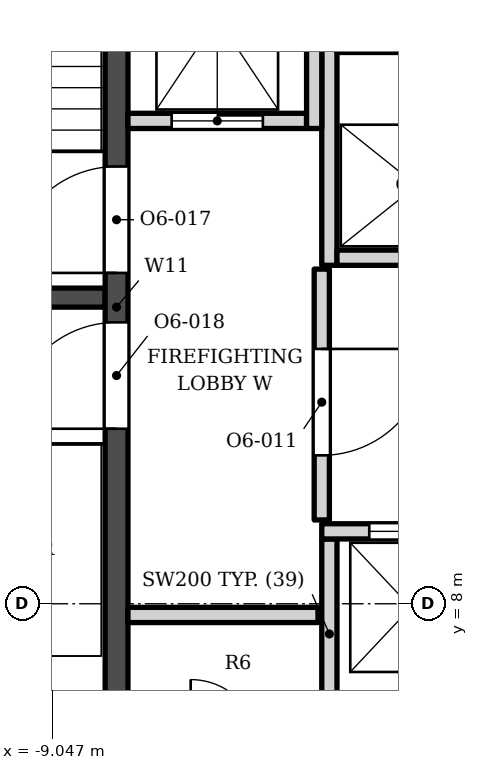
"""IFC4 building model, lengths in metres.
Left out: names, types, materials, properties, quantities, classifications, styles, units other than length and angle.
Written with IfcOpenShell. Run it as: python <this file> out.ifc"""

import sys

from ifc_helpers import new_model, si_unit, direction, frame, frame_2d, origin, place, context, subcontext, project, spatial, rectangle, extrude, element, fill, save


model = new_model("IFC4")
c1 = context("Model", 3, precision=1e-05, world=origin(), true_north=direction((0.0, 1.0)))
c2 = subcontext(c1, "Body", "Model", "MODEL_VIEW")
j1 = project(units=[si_unit("LENGTHUNIT", "METRE"), si_unit("PLANEANGLEUNIT", "RADIAN")], contexts=[c1])
p1 = place(None, origin())
s1 = spatial("IfcSite", under=j1, at=p1, CompositionType="ELEMENT")
p2 = place(p1, origin())
s2 = spatial("IfcBuilding", under=s1, at=p2, CompositionType="ELEMENT")
p3 = place(p2, frame((0.0, 0.0, 208.1)))
s3 = spatial("IfcBuildingStorey", under=s2, at=p3, CompositionType="ELEMENT", Elevation=208.1)
p4 = place(p3, frame((-8.2, 5.253, 0.0), z_axis=(0.0, 0.0, 1.0), x_axis=(0.0, 1.0, 0.0)))
e1 = element("IfcWall", 1, at=p4, inside=s3, PredefinedType="SHEAR", context=c2, shape_type="SweptSolid", body=[
    extrude(rectangle(XDim=13.3, YDim=0.3, at=frame_2d((6.65, 0.0))), origin(), (0.0, 0.0, 1.0), 3.9),
])
p5 = place(p4, frame((7.1, 0.0, 0.0)))
e2 = element("IfcOpeningElement", 2, at=p5, cuts=e1, PredefinedType="OPENING", context=c2, shape_type="SweptSolid", body=[
    extrude(rectangle(XDim=1.4, YDim=2.1, at=frame_2d((0.7, 1.05))), frame((0.0, 0.16, 0.0), z_axis=(0.0, -1.0, 0.0), x_axis=(1.0, 0.0, 0.0)), (0.0, 0.0, 1.0), 0.32),
])
p6 = place(p4, frame((5.05, 0.0, 0.0)))
e3 = element("IfcOpeningElement", 3, at=p6, cuts=e1, PredefinedType="OPENING", context=c2, shape_type="SweptSolid", body=[
    extrude(rectangle(XDim=1.4, YDim=2.1, at=frame_2d((0.7, 1.05))), frame((0.0, 0.16, 0.0), z_axis=(0.0, -1.0, 0.0), x_axis=(1.0, 0.0, 0.0)), (0.0, 0.0, 1.0), 0.32),
])
p7 = place(p3, frame((-12.1, 12.028, 0.0), z_axis=(0.0, 0.0, 1.0), x_axis=(1.0, 0.0, 0.0)))
e4 = element("IfcWall", 4, at=p7, inside=s3, PredefinedType="SHEAR", context=c2, shape_type="SweptSolid", body=[
    extrude(rectangle(XDim=3.75, YDim=0.25, at=frame_2d((1.875, 0.0))), origin(), (0.0, 0.0, 1.0), 3.9),
])
for number, where, z_axis, x_axis in (
    (5, (-5.4, 6.353, 0.0), (0.0, 0.0, 1.0), (0.0, 1.0, 0.0)),
    (6, (-8.05, 7.853, 0.0), (0.0, 0.0, 1.0), (1.0, 0.0, 0.0)),
):
    element("IfcWall", number, at=place(p3, frame(where, z_axis=z_axis, x_axis=x_axis)), inside=s3, PredefinedType="SOLIDWALL", context=c2, shape_type="SweptSolid", body=[
        extrude(rectangle(XDim=2.5, YDim=0.2, at=frame_2d((1.25, 0.0))), origin(), (0.0, 0.0, 1.0), 3.73),
    ])
p8 = place(p3, frame((-5.5, 8.953, 0.0), z_axis=(0.0, 0.0, 1.0), x_axis=(1.0, 0.0, 0.0)))
e7 = element("IfcWall", 7, at=p8, inside=s3, PredefinedType="SOLIDWALL", context=c2, shape_type="SweptSolid", body=[
    extrude(rectangle(XDim=4.5, YDim=0.2, at=frame_2d((2.25, 0.0))), origin(), (0.0, 0.0, 1.0), 3.73),
])
p9 = place(p8, frame((0.625, 0.0, 0.0)))
e8 = element("IfcOpeningElement", 8, at=p9, cuts=e7, PredefinedType="OPENING", context=c2, shape_type="SweptSolid", body=[
    extrude(rectangle(XDim=1.1, YDim=2.1, at=frame_2d((0.55, 1.05))), frame((0.0, 0.11, 0.0), z_axis=(0.0, -1.0, 0.0), x_axis=(1.0, 0.0, 0.0)), (0.0, 0.0, 1.0), 0.22),
])
p10 = place(p8, frame((2.775, 0.0, 0.0)))
e9 = element("IfcOpeningElement", 9, at=p10, cuts=e7, PredefinedType="OPENING", context=c2, shape_type="SweptSolid", body=[
    extrude(rectangle(XDim=1.1, YDim=2.1, at=frame_2d((0.55, 1.05))), frame((0.0, 0.11, 0.0), z_axis=(0.0, -1.0, 0.0), x_axis=(1.0, 0.0, 0.0)), (0.0, 0.0, 1.0), 0.22),
])
p11 = place(p3, frame((-5.5, 9.103, 0.0), z_axis=(0.0, 0.0, 1.0), x_axis=(0.0, 1.0, 0.0)))
e10 = element("IfcWall", 10, at=p11, inside=s3, PredefinedType="SOLIDWALL", context=c2, shape_type="SweptSolid", body=[
    extrude(rectangle(XDim=3.3, YDim=0.2, at=frame_2d((1.65, 0.0))), origin(), (0.0, 0.0, 1.0), 3.73),
])
p12 = place(p11, frame((0.85, 0.0, 0.0)))
e11 = element("IfcOpeningElement", 11, at=p12, cuts=e10, PredefinedType="OPENING", context=c2, shape_type="SweptSolid", body=[
    extrude(rectangle(XDim=1.4, YDim=2.1, at=frame_2d((0.7, 1.05))), frame((0.0, 0.11, 0.0), z_axis=(0.0, -1.0, 0.0), x_axis=(1.0, 0.0, 0.0)), (0.0, 0.0, 1.0), 0.22),
])
p13 = place(p3, frame((-5.4, 12.453, 0.0), z_axis=(0.0, 0.0, 1.0), x_axis=(0.0, 1.0, 0.0)))
e12 = element("IfcWall", 12, at=p13, inside=s3, PredefinedType="SOLIDWALL", context=c2, shape_type="SweptSolid", body=[
    extrude(rectangle(XDim=3.0, YDim=0.2, at=frame_2d((1.5, 0.0))), origin(), (0.0, 0.0, 1.0), 3.73),
])
p14 = place(p3, frame((-5.3, 12.552, 0.0), z_axis=(0.0, 0.0, 1.0), x_axis=(1.0, 0.0, 0.0)))
e13 = element("IfcWall", 13, at=p14, inside=s3, PredefinedType="SOLIDWALL", context=c2, shape_type="SweptSolid", body=[
    extrude(rectangle(XDim=2.1, YDim=0.2, at=frame_2d((1.05, 0.0))), origin(), (0.0, 0.0, 1.0), 3.73),
])
p15 = place(p3, frame((-8.05, 14.353, 0.0), z_axis=(0.0, 0.0, 1.0), x_axis=(1.0, 0.0, 0.0)))
e14 = element("IfcWall", 14, at=p15, inside=s3, PredefinedType="SOLIDWALL", context=c2, shape_type="SweptSolid", body=[
    extrude(rectangle(XDim=2.35, YDim=0.2, at=frame_2d((1.175, 0.0))), origin(), (0.0, 0.0, 1.0), 3.73),
])
p16 = place(p15, frame((0.575, 0.0, 0.0)))
e15 = element("IfcOpeningElement", 15, at=p16, cuts=e14, PredefinedType="OPENING", context=c2, shape_type="SweptSolid", body=[
    extrude(rectangle(XDim=1.2, YDim=2.1, at=frame_2d((0.6, 1.05))), frame((0.0, 0.11, 0.0), z_axis=(0.0, -1.0, 0.0), x_axis=(1.0, 0.0, 0.0)), (0.0, 0.0, 1.0), 0.22),
])
p17 = place(p3, frame((-5.6, 14.253, 0.0), z_axis=(0.0, 0.0, 1.0), x_axis=(0.0, 1.0, 0.0)))
e16 = element("IfcWall", 16, at=p17, inside=s3, PredefinedType="SOLIDWALL", context=c2, shape_type="SweptSolid", body=[
    extrude(rectangle(XDim=4.3, YDim=0.2, at=frame_2d((2.15, 0.0))), origin(), (0.0, 0.0, 1.0), 3.73),
])
p18 = place(p3, frame((-5.3, 15.353, 0.0), z_axis=(0.0, 0.0, 1.0), x_axis=(1.0, 0.0, 0.0)))
e17 = element("IfcWall", 17, at=p18, inside=s3, PredefinedType="SOLIDWALL", context=c2, shape_type="SweptSolid", body=[
    extrude(rectangle(XDim=2.1, YDim=0.2, at=frame_2d((1.05, 0.0))), origin(), (0.0, 0.0, 1.0), 3.73),
])
p19 = place(p9, origin())
e18 = element("IfcDoor", 18, at=p19, inside=s3, OperationType="DOUBLE_DOOR_SLIDING", PredefinedType="DOOR", context=c2, shape_type="SweptSolid", body=[
    extrude(rectangle(XDim=1.1, YDim=2.1, at=frame_2d((0.55, 1.05))), frame((0.0, 0.025, 0.0), z_axis=(0.0, -1.0, 0.0), x_axis=(1.0, 0.0, 0.0)), (0.0, 0.0, 1.0), 0.05),
])
fill(e8, e18)
p20 = place(p16, origin())
e19 = element("IfcDoor", 19, at=p20, inside=s3, OperationType="DOUBLE_DOOR_SLIDING", PredefinedType="DOOR", context=c2, shape_type="SweptSolid", body=[
    extrude(rectangle(XDim=1.2, YDim=2.1, at=frame_2d((0.6, 1.05))), frame((0.0, 0.025, 0.0), z_axis=(0.0, -1.0, 0.0), x_axis=(1.0, 0.0, 0.0)), (0.0, 0.0, 1.0), 0.05),
])
fill(e15, e19)
p21 = place(p5, origin())
e20 = element("IfcDoor", 20, at=p21, inside=s3, OperationType="SINGLE_SWING_LEFT", PredefinedType="DOOR", context=c2, shape_type="SweptSolid", body=[
    extrude(rectangle(XDim=1.4, YDim=2.1, at=frame_2d((0.7, 1.05))), frame((0.0, 0.025, 0.0), z_axis=(0.0, -1.0, 0.0), x_axis=(1.0, 0.0, 0.0)), (0.0, 0.0, 1.0), 0.05),
])
fill(e2, e20)
p22 = place(p6, origin())
e21 = element("IfcDoor", 21, at=p22, inside=s3, OperationType="SINGLE_SWING_LEFT", PredefinedType="DOOR", context=c2, shape_type="SweptSolid", body=[
    extrude(rectangle(XDim=1.4, YDim=2.1, at=frame_2d((0.7, 1.05))), frame((0.0, 0.025, 0.0), z_axis=(0.0, -1.0, 0.0), x_axis=(1.0, 0.0, 0.0)), (0.0, 0.0, 1.0), 0.05),
])
fill(e3, e21)
p23 = place(p12, origin())
e22 = element("IfcDoor", 22, at=p23, inside=s3, OperationType="SINGLE_SWING_RIGHT", PredefinedType="DOOR", context=c2, shape_type="SweptSolid", body=[
    extrude(rectangle(XDim=1.4, YDim=2.1, at=frame_2d((0.7, 1.05))), frame((0.0, 0.025, 0.0), z_axis=(0.0, -1.0, 0.0), x_axis=(1.0, 0.0, 0.0)), (0.0, 0.0, 1.0), 0.05),
])
fill(e11, e22)
save(model, sys.argv[1])
